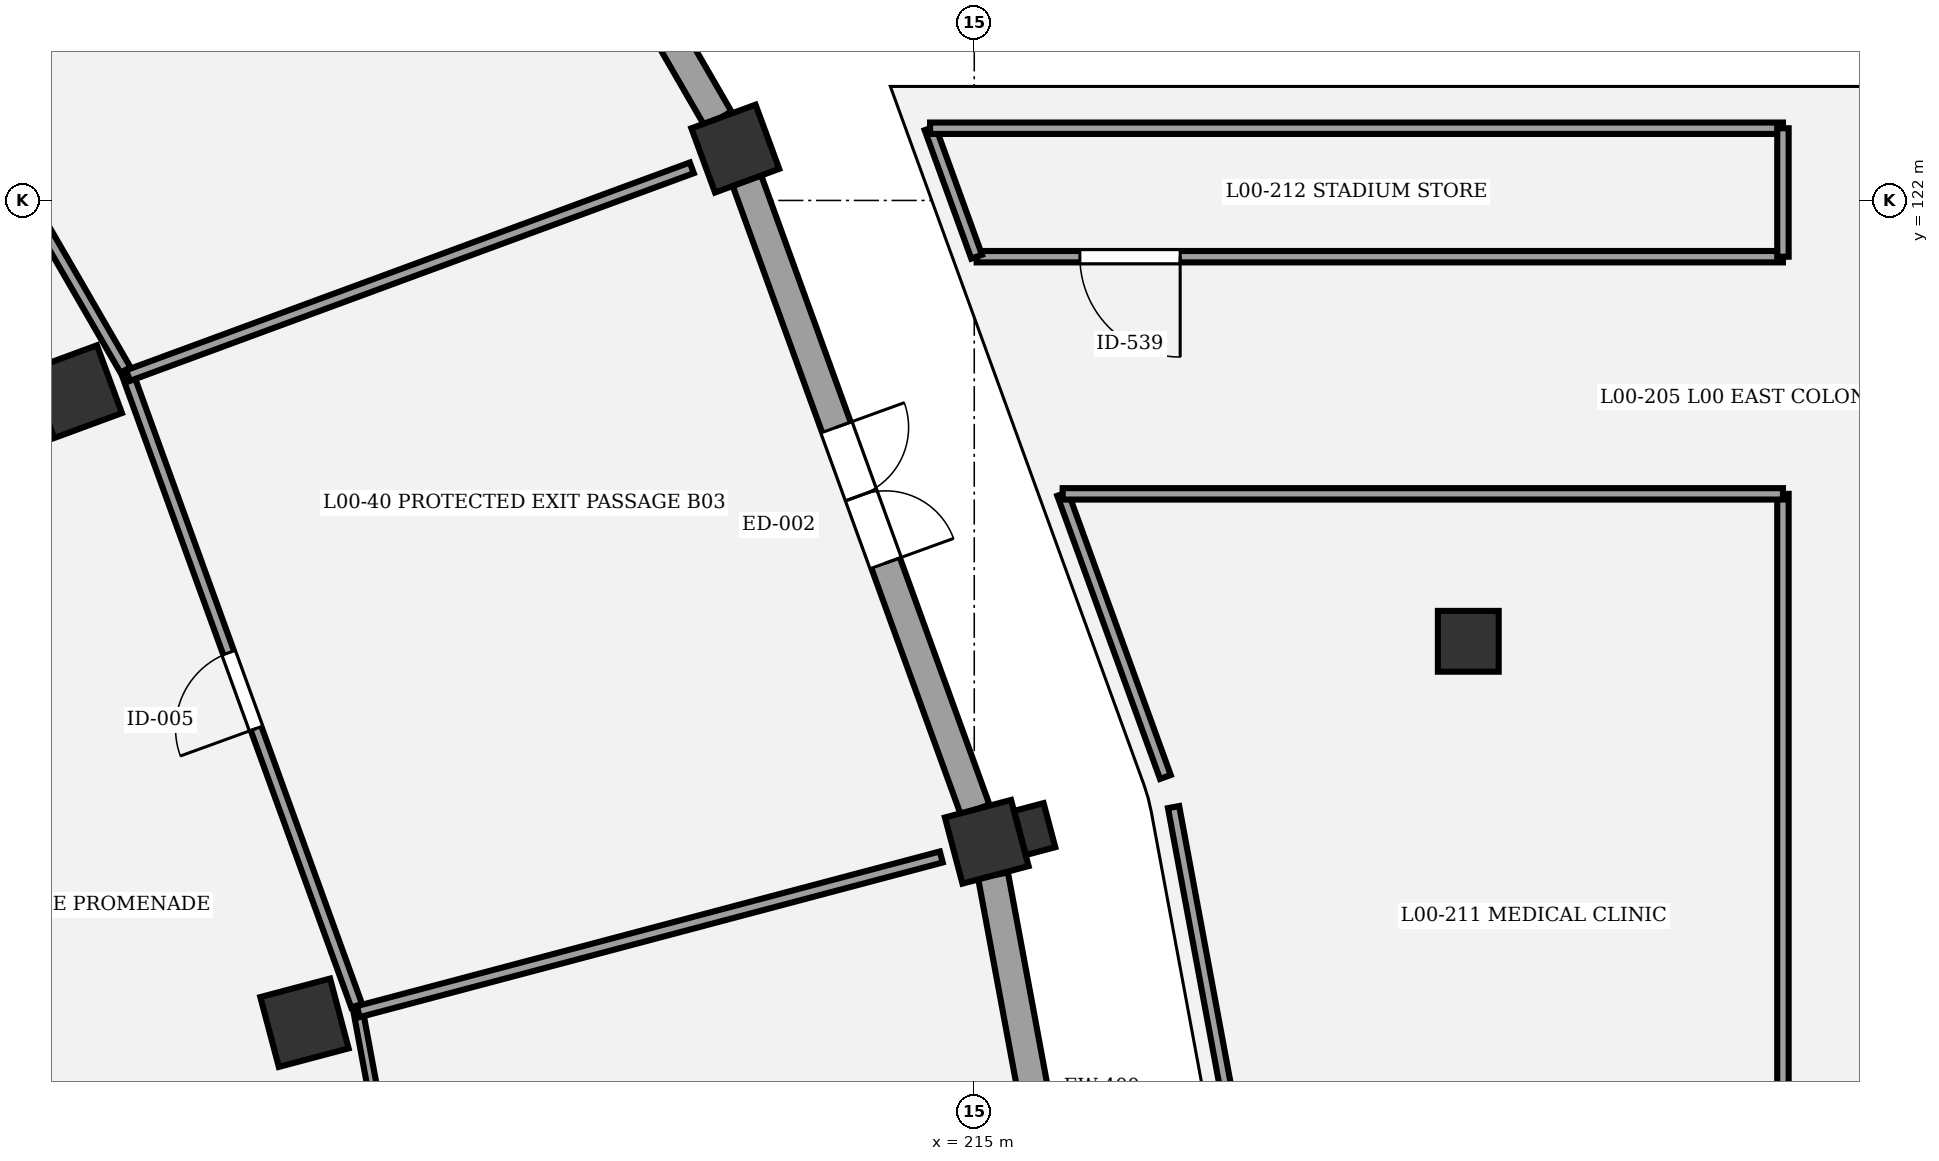
"""IFC4 building model, lengths in metres.
Left out: names, types, materials, properties, quantities, classifications, styles, units other than length and angle.
Written with IfcOpenShell. Run it as: python <this file> out.ifc"""

import sys

from ifc_helpers import new_model, si_unit, direction, frame, frame_2d, origin, origin_2d, place, context, subcontext, project, spatial, rectangle, circle, extrude, element, fill, save


model = new_model("IFC4")
c1 = context("Model", 3, precision=1e-05, world=origin(), true_north=direction((0.0, 1.0)))
c2 = subcontext(c1, "Body", "Model", "MODEL_VIEW")
j1 = project(units=[si_unit("LENGTHUNIT", "METRE"), si_unit("PLANEANGLEUNIT", "RADIAN")], contexts=[c1])
p1 = place(None, origin())
s1 = spatial("IfcSite", under=j1, at=p1, CompositionType="ELEMENT")
p2 = place(p1, origin())
s2 = spatial("IfcBuilding", under=s1, at=p2, CompositionType="ELEMENT")
p3 = place(p2, origin())
s3 = spatial("IfcBuildingStorey", under=s2, at=p3, CompositionType="ELEMENT", Elevation=0.0)
p4 = place(p3, frame((206.188, 111.182, 0.0), z_axis=(0.0, 0.0, 1.0), x_axis=(0.966600102017, 0.256289373133, 0.0)))
e1 = element("IfcColumn", 1, at=p4, inside=s3, PredefinedType="COLUMN", context=c2, shape_type="SweptSolid", body=[
    extrude(rectangle(XDim=0.95, YDim=0.95, at=origin_2d()), origin(), (0.0, 0.0, 1.0), 5.4),
])
p5 = place(p3, frame((215.165, 113.562, 0.0), z_axis=(0.0, 0.0, 1.0), x_axis=(0.966600102017, 0.256289373133, 0.0)))
e2 = element("IfcColumn", 2, at=p5, inside=s3, PredefinedType="COLUMN", context=c2, shape_type="SweptSolid", body=[
    extrude(rectangle(XDim=0.9, YDim=0.9, at=origin_2d()), origin(), (0.0, 0.0, 1.0), 5.4),
])
p6 = place(p3, frame((215.796, 113.73, 0.0), z_axis=(0.0, 0.0, 1.0), x_axis=(-0.256289373133, 0.966600102017, 0.0)))
e3 = element("IfcColumn", 3, at=p6, inside=s3, PredefinedType="PILASTER", context=c2, shape_type="SweptSolid", body=[
    extrude(rectangle(XDim=0.6, YDim=0.4, at=origin_2d()), origin(), (0.0, 0.0, 1.0), 5.4),
])
p7 = place(p3, frame((203.176, 119.484, 0.0), z_axis=(0.0, 0.0, 1.0), x_axis=(0.938372433776, 0.34562577382, 0.0)))
e4 = element("IfcColumn", 4, at=p7, inside=s3, PredefinedType="COLUMN", context=c2, shape_type="SweptSolid", body=[
    extrude(rectangle(XDim=0.95, YDim=0.95, at=origin_2d()), origin(), (0.0, 0.0, 1.0), 5.4),
])
p8 = place(p3, frame((211.856, 122.682, 0.0), z_axis=(0.0, 0.0, 1.0), x_axis=(0.938372433776, 0.34562577382, 0.0)))
e5 = element("IfcColumn", 5, at=p8, inside=s3, PredefinedType="COLUMN", context=c2, shape_type="SweptSolid", body=[
    extrude(rectangle(XDim=0.9, YDim=0.9, at=origin_2d()), origin(), (0.0, 0.0, 1.0), 5.4),
])
p9 = place(p3, frame((221.5, 116.2, 0.0), z_axis=(0.0, 0.0, 1.0), x_axis=(1.0, 0.0, 0.0)))
e6 = element("IfcColumn", 6, at=p9, inside=s3, PredefinedType="COLUMN", context=c2, shape_type="SweptSolid", body=[
    extrude(circle(Radius=0.4, at=origin_2d()), origin(), (0.0, 0.0, 1.0), 5.4),
])
p10 = place(p3, frame((215.246, 113.122, 0.0), z_axis=(0.0, 0.0, 1.0), x_axis=(0.182624880635, -0.98318266511, 0.0)))
e7 = element("IfcWall", 7, at=p10, inside=s3, PredefinedType="STANDARD", context=c2, shape_type="SweptSolid", body=[
    extrude(rectangle(XDim=10.005, YDim=0.4, at=frame_2d((5.002, 0.0))), origin(), (0.0, 0.0, 1.0), 4.25),
])
p11 = place(p10, frame((4.102, 0.0, 0.0)))
e8 = element("IfcOpeningElement", 8, at=p11, cuts=e7, PredefinedType="OPENING", context=c2, shape_type="SweptSolid", body=[
    extrude(rectangle(XDim=1.8, YDim=2.4, at=frame_2d((0.9, 1.2))), frame((0.0, 0.21, 0.0), z_axis=(0.0, -1.0, 0.0), x_axis=(1.0, 0.0, 0.0)), (0.0, 0.0, 1.0), 0.42),
])
p12 = place(p3, frame((212.009, 122.261, 0.0), z_axis=(0.0, 0.0, 1.0), x_axis=(0.341030587203, -0.940052199929, 0.0)))
e9 = element("IfcWall", 9, at=p12, inside=s3, PredefinedType="STANDARD", context=c2, shape_type="SweptSolid", body=[
    extrude(rectangle(XDim=8.805, YDim=0.4, at=frame_2d((4.403, 0.0))), origin(), (0.0, 0.0, 1.0), 4.25),
])
p13 = place(p12, frame((3.453, 0.0, 0.0)))
e10 = element("IfcOpeningElement", 10, at=p13, cuts=e9, PredefinedType="OPENING", context=c2, shape_type="SweptSolid", body=[
    extrude(rectangle(XDim=1.9, YDim=2.4, at=frame_2d((0.95, 1.2))), frame((0.0, 0.21, 0.0), z_axis=(0.0, -1.0, 0.0), x_axis=(1.0, 0.0, 0.0)), (0.0, 0.0, 1.0), 0.42),
])
p14 = place(p3, frame((207.467, 130.274, 0.0), z_axis=(0.0, 0.0, 1.0), x_axis=(0.500543493437, -0.865711390232, 0.0)))
e11 = element("IfcWall", 11, at=p14, inside=s3, PredefinedType="STANDARD", context=c2, shape_type="SweptSolid", body=[
    extrude(rectangle(XDim=8.321, YDim=0.4, at=frame_2d((4.161, 0.0))), origin(), (0.0, 0.0, 1.0), 4.25),
])
p15 = place(p14, frame((3.161, 0.0, 0.0)))
e12 = element("IfcOpeningElement", 12, at=p15, cuts=e11, PredefinedType="OPENING", context=c2, shape_type="SweptSolid", body=[
    extrude(rectangle(XDim=2.0, YDim=2.4, at=frame_2d((1.0, 1.2))), frame((0.0, 0.21, 0.0), z_axis=(0.0, -1.0, 0.0), x_axis=(1.0, 0.0, 0.0)), (0.0, 0.0, 1.0), 0.42),
])
p16 = place(p3, frame((208.707, 101.575, 0.0), z_axis=(0.0, 0.0, 1.0), x_axis=(-0.182618024057, 0.983183938686, 0.0)))
e13 = element("IfcWall", 13, at=p16, inside=s3, PredefinedType="PARTITIONING", context=c2, shape_type="SweptSolid", body=[
    extrude(rectangle(XDim=9.92, YDim=0.125, at=frame_2d((4.96, 0.0))), origin(), (0.0, 0.0, 1.0), 4.15),
])
p17 = place(p16, frame((4.47, 0.0, 0.0)))
e14 = element("IfcOpeningElement", 14, at=p17, cuts=e13, PredefinedType="OPENING", context=c2, shape_type="SweptSolid", body=[
    extrude(rectangle(XDim=0.98, YDim=2.1, at=frame_2d((0.49, 1.05))), frame((0.0, 0.073, 0.0), z_axis=(0.0, -1.0, 0.0), x_axis=(1.0, 0.0, 0.0)), (0.0, 0.0, 1.0), 0.145),
])
p18 = place(p3, frame((206.874, 111.405, 0.0), z_axis=(0.0, 0.0, 1.0), x_axis=(-0.341031741571, 0.940051781149, 0.0)))
e15 = element("IfcWall", 15, at=p18, inside=s3, PredefinedType="PARTITIONING", context=c2, shape_type="SweptSolid", body=[
    extrude(rectangle(XDim=8.82, YDim=0.15, at=frame_2d((4.41, 0.0))), origin(), (0.0, 0.0, 1.0), 4.15),
])
p19 = place(p18, frame((3.88, 0.0, 0.0)))
e16 = element("IfcOpeningElement", 16, at=p19, cuts=e15, PredefinedType="OPENING", context=c2, shape_type="SweptSolid", body=[
    extrude(rectangle(XDim=1.06, YDim=2.1, at=frame_2d((0.53, 1.05))), frame((0.0, 0.085, 0.0), z_axis=(0.0, -1.0, 0.0), x_axis=(1.0, 0.0, 0.0)), (0.0, 0.0, 1.0), 0.17),
])
p20 = place(p3, frame((203.833, 119.769, 0.0), z_axis=(0.0, 0.0, 1.0), x_axis=(-0.500559280672, 0.865702262059, 0.0)))
e17 = element("IfcWall", 17, at=p20, inside=s3, PredefinedType="PARTITIONING", context=c2, shape_type="SweptSolid", body=[
    extrude(rectangle(XDim=8.375, YDim=0.15, at=frame_2d((4.187, 0.0))), origin(), (0.0, 0.0, 1.0), 4.15),
])
p21 = place(p20, frame((3.617, 0.0, 0.0)))
e18 = element("IfcOpeningElement", 18, at=p21, cuts=e17, PredefinedType="OPENING", context=c2, shape_type="SweptSolid", body=[
    extrude(rectangle(XDim=1.14, YDim=2.1, at=frame_2d((0.57, 1.05))), frame((0.0, 0.085, 0.0), z_axis=(0.0, -1.0, 0.0), x_axis=(1.0, 0.0, 0.0)), (0.0, 0.0, 1.0), 0.17),
])
p22 = place(p3, frame((225.64, 118.14, 0.0), z_axis=(0.0, 0.0, 1.0), x_axis=(0.0, -1.0, 0.0)))
e19 = element("IfcWall", 19, at=p22, inside=s3, PredefinedType="PARTITIONING", context=c2, shape_type="SweptSolid", body=[
    extrude(rectangle(XDim=18.69, YDim=0.15, at=frame_2d((9.345, 0.0))), origin(), (0.0, 0.0, 1.0), 4.15),
])
p23 = place(p22, frame((11.233, 0.0, 0.0)))
e20 = element("IfcOpeningElement", 20, at=p23, cuts=e19, PredefinedType="OPENING", context=c2, shape_type="SweptSolid", body=[
    extrude(rectangle(XDim=1.26, YDim=2.3, at=frame_2d((0.63, 1.15))), frame((0.0, 0.085, 0.0), z_axis=(0.0, -1.0, 0.0), x_axis=(1.0, 0.0, 0.0)), (0.0, 0.0, 1.0), 0.17),
])
p24 = place(p3, frame((225.64, 121.26, 0.0), z_axis=(0.0, 0.0, 1.0), x_axis=(-1.0, 0.0, 0.0)))
e21 = element("IfcWall", 21, at=p24, inside=s3, PredefinedType="PARTITIONING", context=c2, shape_type="SweptSolid", body=[
    extrude(rectangle(XDim=10.608, YDim=0.15, at=frame_2d((5.304, 0.0))), origin(), (0.0, 0.0, 1.0), 4.15),
])
p25 = place(p24, frame((7.931, 0.0, 0.0)))
e22 = element("IfcOpeningElement", 22, at=p25, cuts=e21, PredefinedType="OPENING", context=c2, shape_type="SweptSolid", body=[
    extrude(rectangle(XDim=1.32, YDim=2.3, at=frame_2d((0.66, 1.15))), frame((0.0, 0.085, 0.0), z_axis=(0.0, -1.0, 0.0), x_axis=(1.0, 0.0, 0.0)), (0.0, 0.0, 1.0), 0.17),
])
p26 = place(p3, frame((206.895, 111.328, 0.0), z_axis=(0.0, 0.0, 1.0), x_axis=(0.966593450181, 0.25631445934, 0.0)))
e23 = element("IfcWall", 23, at=p26, inside=s3, PredefinedType="PARTITIONING", context=c2, shape_type="SweptSolid", body=[
    extrude(rectangle(XDim=7.936, YDim=0.15, at=frame_2d((3.968, 0.0))), origin(), (0.0, 0.0, 1.0), 4.15),
])
p27 = place(p3, frame((203.866, 119.696, 0.0), z_axis=(0.0, 0.0, 1.0), x_axis=(0.938346807893, 0.345695340028, 0.0)))
e24 = element("IfcWall", 24, at=p27, inside=s3, PredefinedType="PARTITIONING", context=c2, shape_type="SweptSolid", body=[
    extrude(rectangle(XDim=7.905, YDim=0.15, at=frame_2d((3.952, 0.0))), origin(), (0.0, 0.0, 1.0), 4.15),
])
p28 = place(p3, frame((219.613, 103.302, 0.0), z_axis=(0.0, 0.0, 1.0), x_axis=(-0.182620957058, 0.983183393901, 0.0)))
e25 = element("IfcWall", 25, at=p28, inside=s3, PredefinedType="PARTITIONING", context=c2, shape_type="SweptSolid", body=[
    extrude(rectangle(XDim=10.901, YDim=0.15, at=frame_2d((5.45, 0.0))), origin(), (0.0, 0.0, 1.0), 4.15),
])
p29 = place(p3, frame((217.515, 114.415, 0.0), z_axis=(0.0, 0.0, 1.0), x_axis=(-0.341035525383, 0.94005040845, 0.0)))
e26 = element("IfcWall", 26, at=p29, inside=s3, PredefinedType="PARTITIONING", context=c2, shape_type="SweptSolid", body=[
    extrude(rectangle(XDim=3.962, YDim=0.15, at=frame_2d((1.981, 0.0))), origin(), (0.0, 0.0, 1.0), 4.15),
])
p30 = place(p3, frame((216.163, 118.14, 0.0), z_axis=(0.0, 0.0, 1.0), x_axis=(1.0, 0.0, 0.0)))
e27 = element("IfcWall", 27, at=p30, inside=s3, PredefinedType="PARTITIONING", context=c2, shape_type="SweptSolid", body=[
    extrude(rectangle(XDim=9.477, YDim=0.15, at=frame_2d((4.738, 0.0))), origin(), (0.0, 0.0, 1.0), 4.15),
])
p31 = place(p3, frame((215.031, 121.26, 0.0), z_axis=(0.0, 0.0, 1.0), x_axis=(-0.341012375502, 0.940058806541, 0.0)))
e28 = element("IfcWall", 28, at=p31, inside=s3, PredefinedType="PARTITIONING", context=c2, shape_type="SweptSolid", body=[
    extrude(rectangle(XDim=1.798, YDim=0.15, at=frame_2d((0.899, 0.0))), origin(), (0.0, 0.0, 1.0), 4.15),
])
p32 = place(p3, frame((214.418, 122.95, 0.0), z_axis=(0.0, 0.0, 1.0), x_axis=(1.0, 0.0, 0.0)))
e29 = element("IfcWall", 29, at=p32, inside=s3, PredefinedType="PARTITIONING", context=c2, shape_type="SweptSolid", body=[
    extrude(rectangle(XDim=11.221, YDim=0.15, at=frame_2d((5.611, 0.0))), origin(), (0.0, 0.0, 1.0), 4.15),
])
p33 = place(p3, frame((225.64, 122.95, 0.0), z_axis=(0.0, 0.0, 1.0), x_axis=(0.0, -1.0, 0.0)))
e30 = element("IfcWall", 30, at=p33, inside=s3, PredefinedType="PARTITIONING", context=c2, shape_type="SweptSolid", body=[
    extrude(rectangle(XDim=1.69, YDim=0.15, at=frame_2d((0.845, 0.0))), origin(), (0.0, 0.0, 1.0), 4.15),
])
p34 = place(p13, origin())
e31 = element("IfcDoor", 31, at=p34, inside=s3, OperationType="DOUBLE_DOOR_SINGLE_SWING", PredefinedType="DOOR", context=c2, shape_type="SweptSolid", body=[
    extrude(rectangle(XDim=1.9, YDim=2.4, at=frame_2d((0.95, 1.2))), frame((0.0, 0.025, 0.0), z_axis=(0.0, -1.0, 0.0), x_axis=(1.0, 0.0, 0.0)), (0.0, 0.0, 1.0), 0.05),
])
fill(e10, e31)
p35 = place(p19, origin())
e32 = element("IfcDoor", 32, at=p35, inside=s3, OperationType="SINGLE_SWING_LEFT", PredefinedType="DOOR", context=c2, shape_type="SweptSolid", body=[
    extrude(rectangle(XDim=1.06, YDim=2.1, at=frame_2d((0.53, 1.05))), frame((0.0, 0.025, 0.0), z_axis=(0.0, -1.0, 0.0), x_axis=(1.0, 0.0, 0.0)), (0.0, 0.0, 1.0), 0.05),
])
fill(e16, e32)
p36 = place(p25, origin())
e33 = element("IfcDoor", 33, at=p36, inside=s3, OperationType="SINGLE_SWING_LEFT", PredefinedType="DOOR", context=c2, shape_type="SweptSolid", body=[
    extrude(rectangle(XDim=1.32, YDim=2.3, at=frame_2d((0.66, 1.15))), frame((0.0, 0.025, 0.0), z_axis=(0.0, -1.0, 0.0), x_axis=(1.0, 0.0, 0.0)), (0.0, 0.0, 1.0), 0.05),
])
fill(e22, e33)
save(model, sys.argv[1])
